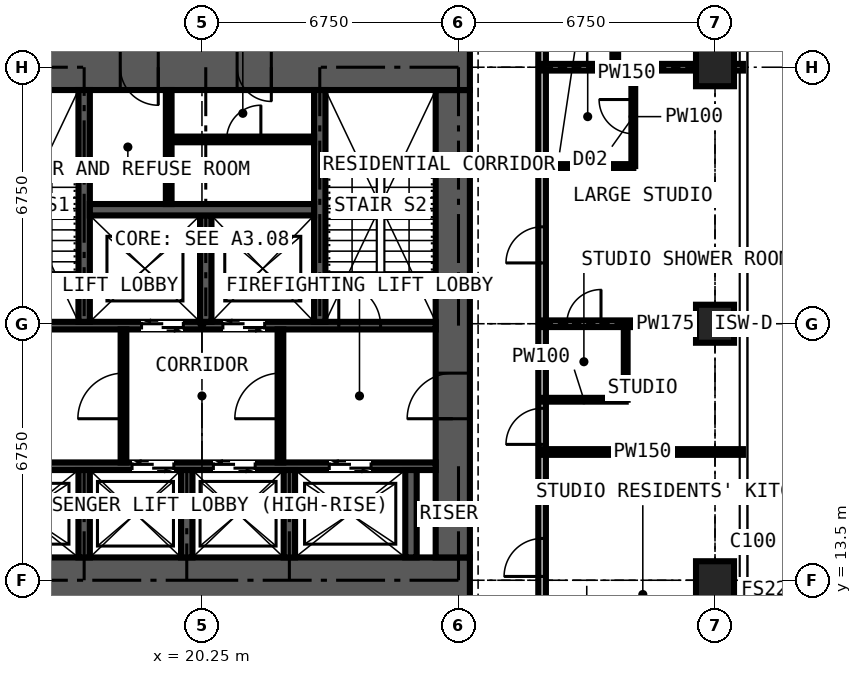
"""IFC4 building model, lengths in metres.
Left out: names, types, materials, properties, quantities, classifications, styles, units other than length and angle.
Written with IfcOpenShell. Run it as: python <this file> out.ifc"""

import sys

from ifc_helpers import new_model, si_unit, direction, frame, frame_2d, origin, origin_2d, place, context, subcontext, project, spatial, rectangle, extrude, element, fill, save


model = new_model("IFC4")
c1 = context("Model", 3, precision=1e-05, world=origin(), true_north=direction((0.0, 1.0)))
c2 = subcontext(c1, "Body", "Model", "MODEL_VIEW")
j1 = project(units=[si_unit("LENGTHUNIT", "METRE"), si_unit("PLANEANGLEUNIT", "RADIAN")], contexts=[c1])
p1 = place(None, origin())
s1 = spatial("IfcSite", under=j1, at=p1, CompositionType="ELEMENT")
p2 = place(p1, origin())
s2 = spatial("IfcBuilding", under=s1, at=p2, CompositionType="ELEMENT")
p3 = place(p2, frame((0.0, 0.0, 229.5)))
s3 = spatial("IfcBuildingStorey", under=s2, at=p3, CompositionType="ELEMENT", Elevation=229.5)
for number, where, z_axis, x_axis in (
    (1, (33.75, 13.5, 0.0), (0.0, 0.0, 1.0), (1.0, 0.0, 0.0)),
    (2, (33.75, 20.25, 0.0), (0.0, 0.0, 1.0), (1.0, 0.0, 0.0)),
    (3, (33.75, 27.0, 0.0), (0.0, 0.0, 1.0), (1.0, 0.0, 0.0)),
):
    element("IfcColumn", number, at=place(p3, frame(where, z_axis=z_axis, x_axis=x_axis)), inside=s3, PredefinedType="COLUMN", context=c2, shape_type="SweptSolid", body=[
        extrude(rectangle(XDim=1.0, YDim=1.0, at=origin_2d()), origin(), (0.0, 0.0, 1.0), 3.6),
    ])
p4 = place(p3, frame((13.2, 13.5, 0.0), z_axis=(0.0, 0.0, 1.0), x_axis=(1.0, 0.0, 0.0)))
e4 = element("IfcWall", 4, at=p4, inside=s3, PredefinedType="SHEAR", context=c2, shape_type="SweptSolid", body=[
    extrude(rectangle(XDim=14.1, YDim=1.2, at=frame_2d((7.05, 0.0))), origin(), (0.0, 0.0, 1.0), 3.6),
])
p5 = place(p3, frame((26.85, 14.1, 0.0), z_axis=(0.0, 0.0, 1.0), x_axis=(0.0, 1.0, 0.0)))
e5 = element("IfcWall", 5, at=p5, inside=s3, PredefinedType="SHEAR", context=c2, shape_type="SweptSolid", body=[
    extrude(rectangle(XDim=12.3, YDim=0.9, at=frame_2d((6.15, 0.0))), origin(), (0.0, 0.0, 1.0), 3.6),
])
p6 = place(p5, frame((3.65, 0.0, 0.0)))
e6 = element("IfcOpeningElement", 6, at=p6, cuts=e5, PredefinedType="OPENING", context=c2, shape_type="SweptSolid", body=[
    extrude(rectangle(XDim=1.2, YDim=2.2, at=frame_2d((0.6, 1.1))), frame((0.0, 0.46, 0.0), z_axis=(0.0, -1.0, 0.0), x_axis=(1.0, 0.0, 0.0)), (0.0, 0.0, 1.0), 0.92),
])
p7 = place(p3, frame((27.3, 27.0, 0.0), z_axis=(0.0, 0.0, 1.0), x_axis=(-1.0, 0.0, 0.0)))
e7 = element("IfcWall", 7, at=p7, inside=s3, PredefinedType="SHEAR", context=c2, shape_type="SweptSolid", body=[
    extrude(rectangle(XDim=14.1, YDim=1.2, at=frame_2d((7.05, 0.0))), origin(), (0.0, 0.0, 1.0), 3.6),
])
p8 = place(p7, frame((5.225, 0.0, 0.0)))
e8 = element("IfcOpeningElement", 8, at=p8, cuts=e7, PredefinedType="OPENING", context=c2, shape_type="SweptSolid", body=[
    extrude(rectangle(XDim=0.9, YDim=2.2, at=frame_2d((0.45, 1.1))), frame((0.0, 0.61, 0.0), z_axis=(0.0, -1.0, 0.0), x_axis=(1.0, 0.0, 0.0)), (0.0, 0.0, 1.0), 1.22),
])
p9 = place(p7, frame((8.2, 0.0, 0.0)))
e9 = element("IfcOpeningElement", 9, at=p9, cuts=e7, PredefinedType="OPENING", context=c2, shape_type="SweptSolid", body=[
    extrude(rectangle(XDim=1.0, YDim=2.2, at=frame_2d((0.5, 1.1))), frame((0.0, 0.61, 0.0), z_axis=(0.0, -1.0, 0.0), x_axis=(1.0, 0.0, 0.0)), (0.0, 0.0, 1.0), 1.22),
])
p10 = place(p3, frame((14.1, 16.5, 0.0), z_axis=(0.0, 0.0, 1.0), x_axis=(1.0, 0.0, 0.0)))
e10 = element("IfcWall", 10, at=p10, inside=s3, PredefinedType="SHEAR", context=c2, shape_type="SweptSolid", body=[
    extrude(rectangle(XDim=12.3, YDim=0.2, at=frame_2d((6.15, 0.0))), origin(), (0.0, 0.0, 1.0), 3.6),
])
p11 = place(p10, frame((0.9, 0.0, 0.0)))
e11 = element("IfcOpeningElement", 11, at=p11, cuts=e10, PredefinedType="OPENING", context=c2, shape_type="SweptSolid", body=[
    extrude(rectangle(XDim=1.1, YDim=2.2, at=frame_2d((0.55, 1.1))), frame((0.0, 0.11, 0.0), z_axis=(0.0, -1.0, 0.0), x_axis=(1.0, 0.0, 0.0)), (0.0, 0.0, 1.0), 0.22),
])
p12 = place(p10, frame((4.31, 0.0, 0.0)))
e12 = element("IfcOpeningElement", 12, at=p12, cuts=e10, PredefinedType="OPENING", context=c2, shape_type="SweptSolid", body=[
    extrude(rectangle(XDim=1.1, YDim=2.2, at=frame_2d((0.55, 1.1))), frame((0.0, 0.11, 0.0), z_axis=(0.0, -1.0, 0.0), x_axis=(1.0, 0.0, 0.0)), (0.0, 0.0, 1.0), 0.22),
])
p13 = place(p10, frame((6.45, 0.0, 0.0)))
e13 = element("IfcOpeningElement", 13, at=p13, cuts=e10, PredefinedType="OPENING", context=c2, shape_type="SweptSolid", body=[
    extrude(rectangle(XDim=1.1, YDim=2.2, at=frame_2d((0.55, 1.1))), frame((0.0, 0.11, 0.0), z_axis=(0.0, -1.0, 0.0), x_axis=(1.0, 0.0, 0.0)), (0.0, 0.0, 1.0), 0.22),
])
p14 = place(p10, frame((9.5, 0.0, 0.0)))
e14 = element("IfcOpeningElement", 14, at=p14, cuts=e10, PredefinedType="OPENING", context=c2, shape_type="SweptSolid", body=[
    extrude(rectangle(XDim=1.1, YDim=2.2, at=frame_2d((0.55, 1.1))), frame((0.0, 0.11, 0.0), z_axis=(0.0, -1.0, 0.0), x_axis=(1.0, 0.0, 0.0)), (0.0, 0.0, 1.0), 0.22),
])
p15 = place(p3, frame((14.1, 20.2, 0.0), z_axis=(0.0, 0.0, 1.0), x_axis=(1.0, 0.0, 0.0)))
e15 = element("IfcWall", 15, at=p15, inside=s3, PredefinedType="SHEAR", context=c2, shape_type="SweptSolid", body=[
    extrude(rectangle(XDim=12.3, YDim=0.2, at=frame_2d((6.15, 0.0))), origin(), (0.0, 0.0, 1.0), 3.6),
])
p16 = place(p15, frame((4.56, 0.0, 0.0)))
e16 = element("IfcOpeningElement", 16, at=p16, cuts=e15, PredefinedType="OPENING", context=c2, shape_type="SweptSolid", body=[
    extrude(rectangle(XDim=1.1, YDim=2.2, at=frame_2d((0.55, 1.1))), frame((0.0, 0.11, 0.0), z_axis=(0.0, -1.0, 0.0), x_axis=(1.0, 0.0, 0.0)), (0.0, 0.0, 1.0), 0.22),
])
p17 = place(p15, frame((6.7, 0.0, 0.0)))
e17 = element("IfcOpeningElement", 17, at=p17, cuts=e15, PredefinedType="OPENING", context=c2, shape_type="SweptSolid", body=[
    extrude(rectangle(XDim=1.1, YDim=2.2, at=frame_2d((0.55, 1.1))), frame((0.0, 0.11, 0.0), z_axis=(0.0, -1.0, 0.0), x_axis=(1.0, 0.0, 0.0)), (0.0, 0.0, 1.0), 0.22),
])
p18 = place(p15, frame((0.35, 0.0, 0.0)))
e18 = element("IfcOpeningElement", 18, at=p18, cuts=e15, PredefinedType="OPENING", context=c2, shape_type="SweptSolid", body=[
    extrude(rectangle(XDim=1.1, YDim=2.2, at=frame_2d((0.55, 1.1))), frame((0.0, 0.11, 0.0), z_axis=(0.0, -1.0, 0.0), x_axis=(1.0, 0.0, 0.0)), (0.0, 0.0, 1.0), 0.22),
])
p19 = place(p15, frame((9.75, 0.0, 0.0)))
e19 = element("IfcOpeningElement", 19, at=p19, cuts=e15, PredefinedType="OPENING", context=c2, shape_type="SweptSolid", body=[
    extrude(rectangle(XDim=1.1, YDim=2.2, at=frame_2d((0.55, 1.1))), frame((0.0, 0.11, 0.0), z_axis=(0.0, -1.0, 0.0), x_axis=(1.0, 0.0, 0.0)), (0.0, 0.0, 1.0), 0.22),
])
for number, where, z_axis, x_axis in (
    (20, (17.15, 20.3, 0.0), (0.0, 0.0, 1.0), (0.0, 1.0, 0.0)),
    (21, (23.35, 20.3, 0.0), (0.0, 0.0, 1.0), (0.0, 1.0, 0.0)),
):
    element("IfcWall", number, at=place(p3, frame(where, z_axis=z_axis, x_axis=x_axis)), inside=s3, PredefinedType="SHEAR", context=c2, shape_type="SweptSolid", body=[
        extrude(rectangle(XDim=6.1, YDim=0.3, at=frame_2d((3.05, 0.0))), origin(), (0.0, 0.0, 1.0), 3.6),
    ])
p20 = place(p3, frame((20.35, 20.3, 0.0), z_axis=(0.0, 0.0, 1.0), x_axis=(0.0, 1.0, 0.0)))
e22 = element("IfcWall", 22, at=p20, inside=s3, PredefinedType="SHEAR", context=c2, shape_type="SweptSolid", body=[
    extrude(rectangle(XDim=2.8, YDim=0.3, at=frame_2d((1.4, 0.0))), origin(), (0.0, 0.0, 1.0), 3.6),
])
p21 = place(p3, frame((17.3, 23.25, 0.0), z_axis=(0.0, 0.0, 1.0), x_axis=(1.0, 0.0, 0.0)))
e23 = element("IfcWall", 23, at=p21, inside=s3, PredefinedType="SHEAR", context=c2, shape_type="SweptSolid", body=[
    extrude(rectangle(XDim=5.9, YDim=0.3, at=frame_2d((2.95, 0.0))), origin(), (0.0, 0.0, 1.0), 3.6),
])
for number, where, z_axis, x_axis in (
    (24, (17.15, 14.1, 0.0), (0.0, 0.0, 1.0), (0.0, 1.0, 0.0)),
    (25, (19.85, 14.1, 0.0), (0.0, 0.0, 1.0), (0.0, 1.0, 0.0)),
    (26, (22.55, 14.1, 0.0), (0.0, 0.0, 1.0), (0.0, 1.0, 0.0)),
    (27, (25.75, 14.1, 0.0), (0.0, 0.0, 1.0), (0.0, 1.0, 0.0)),
):
    element("IfcWall", number, at=place(p3, frame(where, z_axis=z_axis, x_axis=x_axis)), inside=s3, PredefinedType="SHEAR", context=c2, shape_type="SweptSolid", body=[
        extrude(rectangle(XDim=2.3, YDim=0.3, at=frame_2d((1.15, 0.0))), origin(), (0.0, 0.0, 1.0), 3.6),
    ])
p22 = place(p3, frame((18.185, 16.6, 0.0), z_axis=(0.0, 0.0, 1.0), x_axis=(0.0, 1.0, 0.0)))
e28 = element("IfcWall", 28, at=p22, inside=s3, PredefinedType="PARTITIONING", context=c2, shape_type="SweptSolid", body=[
    extrude(rectangle(XDim=3.5, YDim=0.15, at=frame_2d((1.75, 0.0))), origin(), (0.0, 0.0, 1.0), 3.375),
])
p23 = place(p22, frame((1.15, 0.0, 0.0)))
e29 = element("IfcOpeningElement", 29, at=p23, cuts=e28, PredefinedType="OPENING", context=c2, shape_type="SweptSolid", body=[
    extrude(rectangle(XDim=1.2, YDim=2.2, at=frame_2d((0.6, 1.1))), frame((0.0, 0.085, 0.0), z_axis=(0.0, -1.0, 0.0), x_axis=(1.0, 0.0, 0.0)), (0.0, 0.0, 1.0), 0.17),
])
p24 = place(p3, frame((22.315, 16.6, 0.0), z_axis=(0.0, 0.0, 1.0), x_axis=(0.0, 1.0, 0.0)))
e30 = element("IfcWall", 30, at=p24, inside=s3, PredefinedType="PARTITIONING", context=c2, shape_type="SweptSolid", body=[
    extrude(rectangle(XDim=3.5, YDim=0.15, at=frame_2d((1.75, 0.0))), origin(), (0.0, 0.0, 1.0), 3.375),
])
p25 = place(p24, frame((1.15, 0.0, 0.0)))
e31 = element("IfcOpeningElement", 31, at=p25, cuts=e30, PredefinedType="OPENING", context=c2, shape_type="SweptSolid", body=[
    extrude(rectangle(XDim=1.2, YDim=2.2, at=frame_2d((0.6, 1.1))), frame((0.0, 0.085, 0.0), z_axis=(0.0, -1.0, 0.0), x_axis=(1.0, 0.0, 0.0)), (0.0, 0.0, 1.0), 0.17),
])
p26 = place(p3, frame((19.375, 23.4, 0.0), z_axis=(0.0, 0.0, 1.0), x_axis=(0.0, 1.0, 0.0)))
e32 = element("IfcWall", 32, at=p26, inside=s3, PredefinedType="PARTITIONING", context=c2, shape_type="SweptSolid", body=[
    extrude(rectangle(XDim=3.0, YDim=0.15, at=frame_2d((1.5, 0.0))), origin(), (0.0, 0.0, 1.0), 3.375),
])
p27 = place(p3, frame((19.45, 25.1, 0.0), z_axis=(0.0, 0.0, 1.0), x_axis=(1.0, 0.0, 0.0)))
e33 = element("IfcWall", 33, at=p27, inside=s3, PredefinedType="PARTITIONING", context=c2, shape_type="SweptSolid", body=[
    extrude(rectangle(XDim=3.75, YDim=0.15, at=frame_2d((1.875, 0.0))), origin(), (0.0, 0.0, 1.0), 3.375),
])
p28 = place(p27, frame((1.45, 0.0, 0.0)))
e34 = element("IfcOpeningElement", 34, at=p28, cuts=e33, PredefinedType="OPENING", context=c2, shape_type="SweptSolid", body=[
    extrude(rectangle(XDim=0.9, YDim=2.2, at=frame_2d((0.45, 1.1))), frame((0.0, 0.085, 0.0), z_axis=(0.0, -1.0, 0.0), x_axis=(1.0, 0.0, 0.0)), (0.0, 0.0, 1.0), 0.17),
])
p29 = place(p3, frame((29.2, 11.3, 0.0), z_axis=(0.0, 0.0, 1.0), x_axis=(0.0, 1.0, 0.0)))
e35 = element("IfcWall", 35, at=p29, inside=s3, PredefinedType="PARTITIONING", context=c2, shape_type="SweptSolid", body=[
    extrude(rectangle(XDim=17.9, YDim=0.2, at=frame_2d((8.95, 0.0))), origin(), (0.0, 0.0, 1.0), 3.375),
])
p30 = place(p29, frame((2.3, 0.0, 0.0)))
e36 = element("IfcOpeningElement", 36, at=p30, cuts=e35, PredefinedType="OPENING", context=c2, shape_type="SweptSolid", body=[
    extrude(rectangle(XDim=1.0, YDim=2.2, at=frame_2d((0.5, 1.1))), frame((0.0, 0.11, 0.0), z_axis=(0.0, -1.0, 0.0), x_axis=(1.0, 0.0, 0.0)), (0.0, 0.0, 1.0), 0.22),
])
p31 = place(p29, frame((10.55, 0.0, 0.0)))
e37 = element("IfcOpeningElement", 37, at=p31, cuts=e35, PredefinedType="OPENING", context=c2, shape_type="SweptSolid", body=[
    extrude(rectangle(XDim=0.95, YDim=2.2, at=frame_2d((0.475, 1.1))), frame((0.0, 0.11, 0.0), z_axis=(0.0, -1.0, 0.0), x_axis=(1.0, 0.0, 0.0)), (0.0, 0.0, 1.0), 0.22),
])
p32 = place(p29, frame((5.775, 0.0, 0.0)))
e38 = element("IfcOpeningElement", 38, at=p32, cuts=e35, PredefinedType="OPENING", context=c2, shape_type="SweptSolid", body=[
    extrude(rectangle(XDim=0.95, YDim=2.2, at=frame_2d((0.475, 1.1))), frame((0.0, 0.11, 0.0), z_axis=(0.0, -1.0, 0.0), x_axis=(1.0, 0.0, 0.0)), (0.0, 0.0, 1.0), 0.22),
])
p33 = place(p29, frame((16.3, 0.0, 0.0)))
e39 = element("IfcOpeningElement", 39, at=p33, cuts=e35, PredefinedType="OPENING", context=c2, shape_type="SweptSolid", body=[
    extrude(rectangle(XDim=1.0, YDim=2.2, at=frame_2d((0.5, 1.1))), frame((0.0, 0.11, 0.0), z_axis=(0.0, -1.0, 0.0), x_axis=(1.0, 0.0, 0.0)), (0.0, 0.0, 1.0), 0.22),
])
p34 = place(p3, frame((29.2, 16.875, 0.0), z_axis=(0.0, 0.0, 1.0), x_axis=(1.0, 0.0, 0.0)))
e40 = element("IfcWall", 40, at=p34, inside=s3, PredefinedType="PARTITIONING", context=c2, shape_type="SweptSolid", body=[
    extrude(rectangle(XDim=5.284, YDim=0.15, at=frame_2d((2.642, 0.0))), origin(), (0.0, 0.0, 1.0), 3.375),
])
p35 = place(p3, frame((29.2, 18.25, 0.0), z_axis=(0.0, 0.0, 1.0), x_axis=(1.0, 0.0, 0.0)))
e41 = element("IfcWall", 41, at=p35, inside=s3, PredefinedType="PARTITIONING", context=c2, shape_type="SweptSolid", body=[
    extrude(rectangle(XDim=2.2, YDim=0.1, at=frame_2d((1.1, 0.0))), origin(), (0.0, 0.0, 1.0), 3.375),
])
p36 = place(p3, frame((29.2, 20.25, 0.0), z_axis=(0.0, 0.0, 1.0), x_axis=(1.0, 0.0, 0.0)))
e42 = element("IfcWall", 42, at=p36, inside=s3, PredefinedType="PARTITIONING", context=c2, shape_type="SweptSolid", body=[
    extrude(rectangle(XDim=5.284, YDim=0.175, at=frame_2d((2.642, 0.0))), origin(), (0.0, 0.0, 1.0), 2.877),
])
p37 = place(p36, frame((0.65, 0.0, 0.0)))
e43 = element("IfcOpeningElement", 43, at=p37, cuts=e42, PredefinedType="OPENING", context=c2, shape_type="SweptSolid", body=[
    extrude(rectangle(XDim=0.9, YDim=2.2, at=frame_2d((0.45, 1.1))), frame((0.0, 0.097, 0.0), z_axis=(0.0, -1.0, 0.0), x_axis=(1.0, 0.0, 0.0)), (0.0, 0.0, 1.0), 0.195),
])
p38 = place(p3, frame((29.2, 24.4, 0.0), z_axis=(0.0, 0.0, 1.0), x_axis=(1.0, 0.0, 0.0)))
e44 = element("IfcWall", 44, at=p38, inside=s3, PredefinedType="PARTITIONING", context=c2, shape_type="SweptSolid", body=[
    extrude(rectangle(XDim=2.4, YDim=0.1, at=frame_2d((1.2, 0.0))), origin(), (0.0, 0.0, 1.0), 3.375),
])
p39 = place(p3, frame((29.2, 27.0, 0.0), z_axis=(0.0, 0.0, 1.0), x_axis=(1.0, 0.0, 0.0)))
e45 = element("IfcWall", 45, at=p39, inside=s3, PredefinedType="PARTITIONING", context=c2, shape_type="SweptSolid", body=[
    extrude(rectangle(XDim=5.284, YDim=0.175, at=frame_2d((2.642, 0.0))), origin(), (0.0, 0.0, 1.0), 2.877),
])
p40 = place(p3, frame((31.125, 27.0, 0.0), z_axis=(0.0, 0.0, 1.0), x_axis=(0.0, 1.0, 0.0)))
e46 = element("IfcWall", 46, at=p40, inside=s3, PredefinedType="PARTITIONING", context=c2, shape_type="SweptSolid", body=[
    extrude(rectangle(XDim=0.734, YDim=0.15, at=frame_2d((0.367, 0.0))), origin(), (0.0, 0.0, 1.0), 3.375),
])
p41 = place(p3, frame((31.4, 18.25, 0.0), z_axis=(0.0, 0.0, 1.0), x_axis=(0.0, 1.0, 0.0)))
e47 = element("IfcWall", 47, at=p41, inside=s3, PredefinedType="PARTITIONING", context=c2, shape_type="SweptSolid", body=[
    extrude(rectangle(XDim=2.0, YDim=0.1, at=frame_2d((1.0, 0.0))), origin(), (0.0, 0.0, 1.0), 3.375),
])
p42 = place(p3, frame((31.6, 24.4, 0.0), z_axis=(0.0, 0.0, 1.0), x_axis=(0.0, 1.0, 0.0)))
e48 = element("IfcWall", 48, at=p42, inside=s3, PredefinedType="PARTITIONING", context=c2, shape_type="SweptSolid", body=[
    extrude(rectangle(XDim=2.6, YDim=0.1, at=frame_2d((1.3, 0.0))), origin(), (0.0, 0.0, 1.0), 3.375),
])
p43 = place(p42, frame((0.85, 0.0, 0.0)))
e49 = element("IfcOpeningElement", 49, at=p43, cuts=e48, PredefinedType="OPENING", context=c2, shape_type="SweptSolid", body=[
    extrude(rectangle(XDim=0.9, YDim=2.2, at=frame_2d((0.45, 1.1))), frame((0.0, 0.06, 0.0), z_axis=(0.0, -1.0, 0.0), x_axis=(1.0, 0.0, 0.0)), (0.0, 0.0, 1.0), 0.12),
])
p44 = place(p12, origin())
e50 = element("IfcDoor", 50, at=p44, inside=s3, OperationType="DOUBLE_DOOR_SLIDING", PredefinedType="DOOR", context=c2, shape_type="SweptSolid", body=[
    extrude(rectangle(XDim=1.1, YDim=2.2, at=frame_2d((0.55, 1.1))), frame((0.0, 0.025, 0.0), z_axis=(0.0, -1.0, 0.0), x_axis=(1.0, 0.0, 0.0)), (0.0, 0.0, 1.0), 0.05),
])
fill(e12, e50)
p45 = place(p13, origin())
e51 = element("IfcDoor", 51, at=p45, inside=s3, OperationType="DOUBLE_DOOR_SLIDING", PredefinedType="DOOR", context=c2, shape_type="SweptSolid", body=[
    extrude(rectangle(XDim=1.1, YDim=2.2, at=frame_2d((0.55, 1.1))), frame((0.0, 0.025, 0.0), z_axis=(0.0, -1.0, 0.0), x_axis=(1.0, 0.0, 0.0)), (0.0, 0.0, 1.0), 0.05),
])
fill(e13, e51)
p46 = place(p14, origin())
e52 = element("IfcDoor", 52, at=p46, inside=s3, OperationType="DOUBLE_DOOR_SLIDING", PredefinedType="DOOR", context=c2, shape_type="SweptSolid", body=[
    extrude(rectangle(XDim=1.1, YDim=2.2, at=frame_2d((0.55, 1.1))), frame((0.0, 0.025, 0.0), z_axis=(0.0, -1.0, 0.0), x_axis=(1.0, 0.0, 0.0)), (0.0, 0.0, 1.0), 0.05),
])
fill(e14, e52)
p47 = place(p16, origin())
e53 = element("IfcDoor", 53, at=p47, inside=s3, OperationType="DOUBLE_DOOR_SLIDING", PredefinedType="DOOR", context=c2, shape_type="SweptSolid", body=[
    extrude(rectangle(XDim=1.1, YDim=2.2, at=frame_2d((0.55, 1.1))), frame((0.0, 0.025, 0.0), z_axis=(0.0, -1.0, 0.0), x_axis=(1.0, 0.0, 0.0)), (0.0, 0.0, 1.0), 0.05),
])
fill(e16, e53)
p48 = place(p17, origin())
e54 = element("IfcDoor", 54, at=p48, inside=s3, OperationType="DOUBLE_DOOR_SLIDING", PredefinedType="DOOR", context=c2, shape_type="SweptSolid", body=[
    extrude(rectangle(XDim=1.1, YDim=2.2, at=frame_2d((0.55, 1.1))), frame((0.0, 0.025, 0.0), z_axis=(0.0, -1.0, 0.0), x_axis=(1.0, 0.0, 0.0)), (0.0, 0.0, 1.0), 0.05),
])
fill(e17, e54)
p49 = place(p6, origin())
e55 = element("IfcDoor", 55, at=p49, inside=s3, OperationType="DOUBLE_DOOR_SINGLE_SWING", PredefinedType="DOOR", context=c2, shape_type="SweptSolid", body=[
    extrude(rectangle(XDim=1.2, YDim=2.2, at=frame_2d((0.6, 1.1))), frame((0.0, 0.025, 0.0), z_axis=(0.0, -1.0, 0.0), x_axis=(1.0, 0.0, 0.0)), (0.0, 0.0, 1.0), 0.05),
])
fill(e6, e55)
p50 = place(p23, origin())
e56 = element("IfcDoor", 56, at=p50, inside=s3, OperationType="DOUBLE_DOOR_SINGLE_SWING", PredefinedType="DOOR", context=c2, shape_type="SweptSolid", body=[
    extrude(rectangle(XDim=1.2, YDim=2.2, at=frame_2d((0.6, 1.1))), frame((0.0, 0.025, 0.0), z_axis=(0.0, -1.0, 0.0), x_axis=(1.0, 0.0, 0.0)), (0.0, 0.0, 1.0), 0.05),
])
fill(e29, e56)
p51 = place(p25, origin())
e57 = element("IfcDoor", 57, at=p51, inside=s3, OperationType="DOUBLE_DOOR_SINGLE_SWING", PredefinedType="DOOR", context=c2, shape_type="SweptSolid", body=[
    extrude(rectangle(XDim=1.2, YDim=2.2, at=frame_2d((0.6, 1.1))), frame((0.0, 0.025, 0.0), z_axis=(0.0, -1.0, 0.0), x_axis=(1.0, 0.0, 0.0)), (0.0, 0.0, 1.0), 0.05),
])
fill(e31, e57)
p52 = place(p28, origin())
e58 = element("IfcDoor", 58, at=p52, inside=s3, OperationType="SINGLE_SWING_RIGHT", PredefinedType="DOOR", context=c2, shape_type="SweptSolid", body=[
    extrude(rectangle(XDim=0.9, YDim=2.2, at=frame_2d((0.45, 1.1))), frame((0.0, 0.025, 0.0), z_axis=(0.0, -1.0, 0.0), x_axis=(1.0, 0.0, 0.0)), (0.0, 0.0, 1.0), 0.05),
])
fill(e34, e58)
p53 = place(p8, origin())
e59 = element("IfcDoor", 59, at=p53, inside=s3, OperationType="SINGLE_SWING_LEFT", PredefinedType="DOOR", context=c2, shape_type="SweptSolid", body=[
    extrude(rectangle(XDim=0.9, YDim=2.2, at=frame_2d((0.45, 1.1))), frame((0.0, 0.4, 0.0), z_axis=(0.0, -1.0, 0.0), x_axis=(1.0, 0.0, 0.0)), (0.0, 0.0, 1.0), 0.8),
])
fill(e8, e59)
p54 = place(p9, origin())
e60 = element("IfcDoor", 60, at=p54, inside=s3, OperationType="SINGLE_SWING_LEFT", PredefinedType="DOOR", context=c2, shape_type="SweptSolid", body=[
    extrude(rectangle(XDim=1.0, YDim=2.2, at=frame_2d((0.5, 1.1))), frame((0.0, 0.025, 0.0), z_axis=(0.0, -1.0, 0.0), x_axis=(1.0, 0.0, 0.0)), (0.0, 0.0, 1.0), 0.05),
])
fill(e9, e60)
p55 = place(p19, origin())
e61 = element("IfcDoor", 61, at=p55, inside=s3, OperationType="SINGLE_SWING_LEFT", PredefinedType="DOOR", context=c2, shape_type="SweptSolid", body=[
    extrude(rectangle(XDim=1.1, YDim=2.2, at=frame_2d((0.55, 1.1))), frame((0.0, 0.025, 0.0), z_axis=(0.0, -1.0, 0.0), x_axis=(1.0, 0.0, 0.0)), (0.0, 0.0, 1.0), 0.05),
])
fill(e19, e61)
p56 = place(p30, origin())
e62 = element("IfcDoor", 62, at=p56, inside=s3, OperationType="SINGLE_SWING_LEFT", PredefinedType="DOOR", context=c2, shape_type="SweptSolid", body=[
    extrude(rectangle(XDim=1.0, YDim=2.2, at=frame_2d((0.5, 1.1))), frame((0.0, 0.025, 0.0), z_axis=(0.0, -1.0, 0.0), x_axis=(1.0, 0.0, 0.0)), (0.0, 0.0, 1.0), 0.05),
])
fill(e36, e62)
p57 = place(p31, origin())
e63 = element("IfcDoor", 63, at=p57, inside=s3, OperationType="SINGLE_SWING_LEFT", PredefinedType="DOOR", context=c2, shape_type="SweptSolid", body=[
    extrude(rectangle(XDim=0.95, YDim=2.2, at=frame_2d((0.475, 1.1))), frame((0.0, 0.025, 0.0), z_axis=(0.0, -1.0, 0.0), x_axis=(1.0, 0.0, 0.0)), (0.0, 0.0, 1.0), 0.05),
])
fill(e37, e63)
p58 = place(p43, origin())
e64 = element("IfcDoor", 64, at=p58, inside=s3, OperationType="SINGLE_SWING_RIGHT", PredefinedType="DOOR", context=c2, shape_type="SweptSolid", body=[
    extrude(rectangle(XDim=0.9, YDim=2.2, at=frame_2d((0.45, 1.1))), frame((0.0, 0.025, 0.0), z_axis=(0.0, -1.0, 0.0), x_axis=(1.0, 0.0, 0.0)), (0.0, 0.0, 1.0), 0.05),
])
fill(e49, e64)
p59 = place(p32, origin())
e65 = element("IfcDoor", 65, at=p59, inside=s3, OperationType="SINGLE_SWING_LEFT", PredefinedType="DOOR", context=c2, shape_type="SweptSolid", body=[
    extrude(rectangle(XDim=0.95, YDim=2.2, at=frame_2d((0.475, 1.1))), frame((0.0, 0.025, 0.0), z_axis=(0.0, -1.0, 0.0), x_axis=(1.0, 0.0, 0.0)), (0.0, 0.0, 1.0), 0.05),
])
fill(e38, e65)
p60 = place(p37, origin())
e66 = element("IfcDoor", 66, at=p60, inside=s3, OperationType="SINGLE_SWING_RIGHT", PredefinedType="DOOR", context=c2, shape_type="SweptSolid", body=[
    extrude(rectangle(XDim=0.9, YDim=2.2, at=frame_2d((0.45, 1.1))), frame((0.0, 0.025, 0.0), z_axis=(0.0, -1.0, 0.0), x_axis=(1.0, 0.0, 0.0)), (0.0, 0.0, 1.0), 0.05),
])
fill(e43, e66)
save(model, sys.argv[1])
